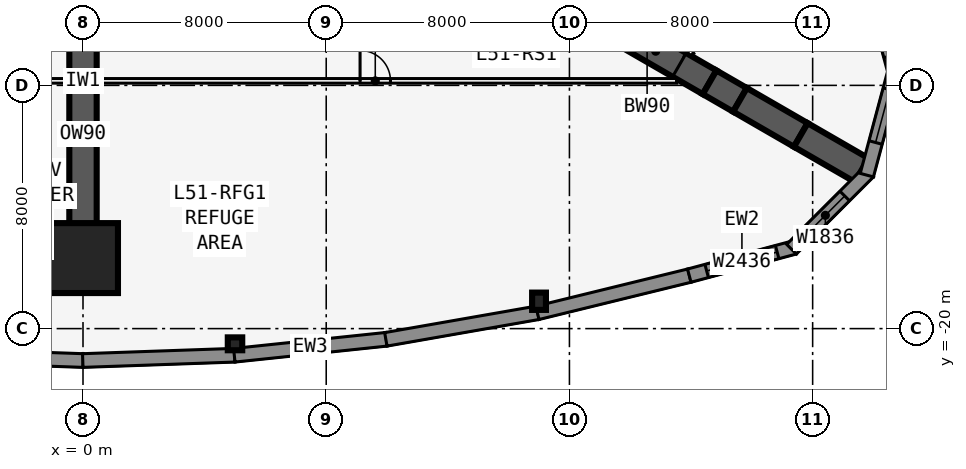
"""IFC4 building model, lengths in metres.
Left out: names, types, materials, properties, quantities, classifications, styles, units other than length and angle.
Written with IfcOpenShell. Run it as: python <this file> out.ifc"""

import sys

from ifc_helpers import new_model, si_unit, direction, frame, frame_2d, origin, origin_2d, place, context, subcontext, project, spatial, polyline, rectangle, i_section, outline, extrude, element, fill, save


model = new_model("IFC4")
c1 = context("Model", 3, precision=1e-05, world=origin(), true_north=direction((0.0, 1.0)))
c2 = subcontext(c1, "Body", "Model", "MODEL_VIEW")
j1 = project(units=[si_unit("LENGTHUNIT", "METRE"), si_unit("PLANEANGLEUNIT", "RADIAN")], contexts=[c1])
p1 = place(None, origin())
s1 = spatial("IfcSite", under=j1, at=p1, CompositionType="ELEMENT")
p2 = place(p1, origin())
s2 = spatial("IfcBuilding", under=s1, at=p2, CompositionType="ELEMENT")
p3 = place(p2, frame((0.0, 0.0, 189.5)))
s3 = spatial("IfcBuildingStorey", under=s2, at=p3, CompositionType="ELEMENT", Elevation=189.5)
p4 = place(p3, frame((16.5, -9.526, 0.0), z_axis=(0.0, 0.0, 1.0), x_axis=(0.866031398331, -0.499989616998, 0.0)))
e1 = element("IfcWall", 1, at=p4, inside=s3, PredefinedType="SHEAR", context=c2, shape_type="SweptSolid", body=[
    extrude(rectangle(XDim=4.746, YDim=0.9, at=frame_2d((2.373, 0.0))), origin(), (0.0, 0.0, 1.0), 6.4),
])
p5 = place(p4, frame((1.8, 0.0, 0.0)))
e2 = element("IfcOpeningElement", 2, at=p5, cuts=e1, PredefinedType="OPENING", context=c2, shape_type="SweptSolid", body=[
    extrude(rectangle(XDim=1.8, YDim=2.13, at=frame_2d((0.9, 1.065))), frame((0.0, 0.46, 0.0), z_axis=(0.0, -1.0, 0.0), x_axis=(1.0, 0.0, 0.0)), (0.0, 0.0, 1.0), 0.92),
])
p6 = place(p3, frame((20.61, -11.899, 0.0), z_axis=(0.0, 0.0, 1.0), x_axis=(0.866009537788, -0.500027479704, 0.0)))
e3 = element("IfcWall", 3, at=p6, inside=s3, PredefinedType="SHEAR", context=c2, shape_type="SweptSolid", body=[
    extrude(rectangle(XDim=1.155, YDim=0.9, at=frame_2d((0.577, 0.0))), origin(), (0.0, 0.0, 1.0), 6.4),
])
for number, where, z_axis, x_axis in (
    (4, (21.61, -12.477, 0.0), (0.0, 0.0, 1.0), (0.866, -0.5, 0.0)),
    (5, (23.61, -13.631, 0.0), (0.0, 0.0, 1.0), (0.866, -0.5, 0.0)),
):
    element("IfcWall", number, at=place(p3, frame(where, z_axis=z_axis, x_axis=x_axis)), inside=s3, PredefinedType="SHEAR", context=c2, shape_type="SweptSolid", body=[
        extrude(rectangle(XDim=2.309, YDim=0.9, at=frame_2d((1.155, 0.0))), origin(), (0.0, 0.0, 1.0), 6.4),
    ])
p7 = place(p3, frame((0.0, -9.526, 0.0), z_axis=(0.0, 0.0, 1.0), x_axis=(0.0, -1.0, 0.0)))
e6 = element("IfcWall", 6, at=p7, inside=s3, PredefinedType="SHEAR", context=c2, shape_type="SweptSolid", body=[
    extrude(rectangle(XDim=8.154, YDim=0.9, at=frame_2d((4.077, 0.0))), origin(), (0.0, 0.0, 1.0), 6.4),
])
p8 = place(p3, frame((5.0, -20.5, 0.0), z_axis=(0.0, 0.0, 1.0), x_axis=(0.0, -1.0, 0.0)))
e7 = element("IfcColumn", 7, at=p8, inside=s3, PredefinedType="COLUMN", context=c2, shape_type="SweptSolid", body=[
    extrude(i_section(OverallWidth=0.424, OverallDepth=0.475, WebThickness=0.048, FlangeThickness=0.077, at=origin_2d()), origin(), (0.0, 0.0, 1.0), 6.4),
])
p9 = place(p3, frame((15.0, -19.1, 0.0), z_axis=(0.0, 0.0, 1.0), x_axis=(1.0, 0.0, 0.0)))
e8 = element("IfcColumn", 8, at=p9, inside=s3, PredefinedType="COLUMN", context=c2, shape_type="SweptSolid", body=[
    extrude(i_section(OverallWidth=0.455, OverallDepth=0.569, WebThickness=0.078, FlangeThickness=0.125, at=origin_2d()), origin(), (0.0, 0.0, 1.0), 6.4),
])
p10 = place(p3, frame((0.0, -17.68, 0.0), z_axis=(0.0, 0.0, 1.0), x_axis=(0.0, -1.0, 0.0)))
e9 = element("IfcColumn", 9, at=p10, inside=s3, PredefinedType="COLUMN", context=c2, shape_type="SweptSolid", body=[
    extrude(rectangle(XDim=2.3, YDim=2.3, at=origin_2d()), origin(), (0.0, 0.0, 1.0), 6.4),
])
for number, where, z_axis, x_axis in (
    (10, (-4.992, -20.875, 0.0), (0.0, 0.0, 1.0), (0.999, -0.035, 0.0)),
    (11, (-0.008, -21.05, 0.0), (0.0, 0.0, 1.0), (0.999, 0.035, 0.0)),
):
    element("IfcWall", number, at=place(p3, frame(where, z_axis=z_axis, x_axis=x_axis)), inside=s3, PredefinedType="SOLIDWALL", context=c2, shape_type="SweptSolid", body=[
        extrude(outline(polyline([(0.0, 0.0), (5.003, 0.0), (5.003, 6.15), (0.0, 6.15), (0.0, 0.0)]), holes=[polyline([(4.402, 3.075), (4.337, 3.567), (4.147, 4.025), (3.845, 4.418), (3.451, 4.72), (2.993, 4.91), (2.501, 4.975), (2.01, 4.91), (1.552, 4.72), (1.158, 4.418), (0.856, 4.025), (0.666, 3.567), (0.602, 3.075), (0.666, 2.583), (0.856, 2.125), (1.158, 1.731), (1.552, 1.43), (2.01, 1.24), (2.501, 1.175), (2.993, 1.24), (3.451, 1.43), (3.845, 1.731), (4.147, 2.125), (4.337, 2.583), (4.402, 3.075)])]), frame((0.0, 0.225, 0.0), z_axis=(0.0, -1.0, 0.0), x_axis=(1.0, 0.0, 0.0)), (0.0, 0.0, 1.0), 0.45),
    ])
p11 = place(p3, frame((4.977, -20.876, 0.0), z_axis=(0.0, 0.0, 1.0), x_axis=(0.994529640305, 0.104454748843, 0.0)))
e12 = element("IfcWall", 12, at=p11, inside=s3, PredefinedType="SOLIDWALL", context=c2, shape_type="SweptSolid", body=[
    extrude(outline(polyline([(0.0, 0.0), (5.028, 0.0), (5.028, 6.15), (0.0, 6.15), (0.0, 0.0)]), holes=[polyline([(4.414, 3.075), (4.349, 3.567), (4.159, 4.025), (3.857, 4.418), (3.464, 4.72), (3.006, 4.91), (2.514, 4.975), (2.022, 4.91), (1.564, 4.72), (1.17, 4.418), (0.868, 4.025), (0.678, 3.567), (0.614, 3.075), (0.678, 2.583), (0.868, 2.125), (1.17, 1.731), (1.564, 1.43), (2.022, 1.24), (2.514, 1.175), (3.006, 1.24), (3.464, 1.43), (3.857, 1.731), (4.159, 2.125), (4.349, 2.583), (4.414, 3.075)])]), frame((0.0, 0.225, 0.0), z_axis=(0.0, -1.0, 0.0), x_axis=(1.0, 0.0, 0.0)), (0.0, 0.0, 1.0), 0.45),
])
p12 = place(p3, frame((9.961, -20.354, 0.0), z_axis=(0.0, 0.0, 1.0), x_axis=(0.985030467156, 0.172380331752, 0.0)))
e13 = element("IfcWall", 13, at=p12, inside=s3, PredefinedType="SOLIDWALL", context=c2, shape_type="SweptSolid", body=[
    extrude(outline(polyline([(0.0, 0.0), (5.076, 0.0), (5.076, 6.15), (0.0, 6.15), (0.0, 0.0)]), holes=[polyline([(4.438, 3.075), (4.373, 3.567), (4.183, 4.025), (3.882, 4.418), (3.488, 4.72), (3.03, 4.91), (2.538, 4.975), (2.046, 4.91), (1.588, 4.72), (1.195, 4.418), (0.893, 4.025), (0.703, 3.567), (0.638, 3.075), (0.703, 2.583), (0.893, 2.125), (1.195, 1.731), (1.588, 1.43), (2.046, 1.24), (2.538, 1.175), (3.03, 1.24), (3.488, 1.43), (3.882, 1.731), (4.183, 2.125), (4.373, 2.583), (4.438, 3.075)])]), frame((0.0, 0.225, 0.0), z_axis=(0.0, -1.0, 0.0), x_axis=(1.0, 0.0, 0.0)), (0.0, 0.0, 1.0), 0.45),
])
p13 = place(p3, frame((14.947, -19.482, 0.0), z_axis=(0.0, 0.0, 1.0), x_axis=(0.971270024053, 0.237980126011, 0.0)))
e14 = element("IfcWall", 14, at=p13, inside=s3, PredefinedType="SOLIDWALL", context=c2, shape_type="SweptSolid", body=[
    extrude(outline(polyline([(0.0, 0.0), (5.148, 0.0), (5.148, 6.15), (0.0, 6.15), (0.0, 0.0)]), holes=[polyline([(4.524, 3.075), (4.458, 3.58), (4.263, 4.05), (3.953, 4.454), (3.549, 4.764), (3.079, 4.958), (2.574, 5.025), (2.069, 4.958), (1.599, 4.764), (1.195, 4.454), (0.885, 4.05), (0.69, 3.58), (0.624, 3.075), (0.69, 2.57), (0.885, 2.1), (1.195, 1.696), (1.599, 1.386), (2.069, 1.191), (2.574, 1.125), (3.079, 1.191), (3.549, 1.386), (3.953, 1.696), (4.263, 2.1), (4.458, 2.57), (4.524, 3.075)])]), frame((0.0, 0.225, 0.0), z_axis=(0.0, -1.0, 0.0), x_axis=(1.0, 0.0, 0.0)), (0.0, 0.0, 1.0), 0.45),
])
p14 = place(p3, frame((19.942, -18.258, 0.0), z_axis=(0.0, 0.0, 1.0), x_axis=(0.965924653531, 0.258823421857, 0.0)))
e15 = element("IfcWall", 15, at=p14, inside=s3, PredefinedType="SOLIDWALL", context=c2, shape_type="SweptSolid", body=[
    extrude(rectangle(XDim=3.586, YDim=0.45, at=frame_2d((1.793, 0.0))), origin(), (0.0, 0.0, 1.0), 6.15),
])
p15 = place(p14, frame((0.593, 0.0, 1.2)))
e16 = element("IfcOpeningElement", 16, at=p15, cuts=e15, PredefinedType="OPENING", context=c2, shape_type="SweptSolid", body=[
    extrude(rectangle(XDim=2.4, YDim=3.6, at=frame_2d((1.2, 1.8))), frame((0.0, 0.235, 0.0), z_axis=(0.0, -1.0, 0.0), x_axis=(1.0, 0.0, 0.0)), (0.0, 0.0, 1.0), 0.47),
])
p16 = place(p3, frame((23.305, -17.388, 0.0), z_axis=(0.0, 0.0, 1.0), x_axis=(0.707106781187, 0.707106781187, 0.0)))
e17 = element("IfcWall", 17, at=p16, inside=s3, PredefinedType="SOLIDWALL", context=c2, shape_type="SweptSolid", body=[
    extrude(outline(polyline([(3.586, 0.225), (3.527, 0.225), (3.035, 0.093), (3.0, 0.225), (0.0, 0.225), (0.0, -0.225), (3.586, -0.225), (3.586, 0.225)])), origin(), (0.0, 0.0, 1.0), 6.15),
])
p17 = place(p16, frame((0.675, 0.0, 1.2)))
e18 = element("IfcOpeningElement", 18, at=p17, cuts=e17, PredefinedType="OPENING", context=c2, shape_type="SweptSolid", body=[
    extrude(rectangle(XDim=1.8, YDim=3.6, at=frame_2d((0.9, 1.8))), frame((0.0, 0.235, 0.0), z_axis=(0.0, -1.0, 0.0), x_axis=(1.0, 0.0, 0.0)), (0.0, 0.0, 1.0), 0.47),
])
p18 = place(p3, frame((25.783, -14.953, 0.0), z_axis=(0.0, 0.0, 1.0), x_axis=(0.258823421857, 0.965924653531, 0.0)))
e19 = element("IfcWall", 19, at=p18, inside=s3, PredefinedType="SOLIDWALL", context=c2, shape_type="SweptSolid", body=[
    extrude(outline(polyline([(3.586, 0.225), (0.586, 0.225), (0.551, 0.093), (0.06, 0.225), (0.0, 0.225), (0.0, -0.225), (3.586, -0.225), (3.586, 0.225)])), origin(), (0.0, 0.0, 1.0), 6.15),
])
p19 = place(p18, frame((1.111, 0.0, 1.2)))
e20 = element("IfcOpeningElement", 20, at=p19, cuts=e19, PredefinedType="OPENING", context=c2, shape_type="SweptSolid", body=[
    extrude(rectangle(XDim=1.8, YDim=3.6, at=frame_2d((0.9, 1.8))), frame((0.0, 0.235, 0.0), z_axis=(0.0, -1.0, 0.0), x_axis=(1.0, 0.0, 0.0)), (0.0, 0.0, 1.0), 0.47),
])
p20 = place(p3, frame((26.711, -11.605, 0.0), z_axis=(0.0, 0.0, 1.0), x_axis=(-0.258823421857, 0.965924653531, 0.0)))
e21 = element("IfcWall", 21, at=p20, inside=s3, PredefinedType="SOLIDWALL", context=c2, shape_type="SweptSolid", body=[
    extrude(rectangle(XDim=3.586, YDim=0.45, at=frame_2d((1.793, 0.0))), origin(), (0.0, 0.0, 1.0), 6.15),
])
p21 = place(p20, frame((0.593, 0.0, 1.2)))
e22 = element("IfcOpeningElement", 22, at=p21, cuts=e21, PredefinedType="OPENING", context=c2, shape_type="SweptSolid", body=[
    extrude(rectangle(XDim=2.4, YDim=3.6, at=frame_2d((1.2, 1.8))), frame((0.0, 0.235, 0.0), z_axis=(0.0, -1.0, 0.0), x_axis=(1.0, 0.0, 0.0)), (0.0, 0.0, 1.0), 0.47),
])
p22 = place(p3, frame((-19.527, -11.851, 0.0), z_axis=(0.0, 0.0, 1.0), x_axis=(1.0, 0.0, 0.0)))
e23 = element("IfcWall", 23, at=p22, inside=s3, PredefinedType="PARTITIONING", context=c2, shape_type="SweptSolid", body=[
    extrude(rectangle(XDim=39.054, YDim=0.15, at=frame_2d((19.527, 0.0))), origin(), (0.0, 0.0, 1.0), 6.15),
])
p23 = place(p22, frame((6.914, 0.0, 0.0)))
e24 = element("IfcOpeningElement", 24, at=p23, cuts=e23, PredefinedType="OPENING", context=c2, shape_type="SweptSolid", body=[
    extrude(rectangle(XDim=1.0, YDim=2.13, at=frame_2d((0.5, 1.065))), frame((0.0, 0.085, 0.0), z_axis=(0.0, -1.0, 0.0), x_axis=(1.0, 0.0, 0.0)), (0.0, 0.0, 1.0), 0.17),
])
p24 = place(p22, frame((16.527, 0.0, 0.0)))
e25 = element("IfcOpeningElement", 25, at=p24, cuts=e23, PredefinedType="OPENING", context=c2, shape_type="SweptSolid", body=[
    extrude(rectangle(XDim=1.0, YDim=2.13, at=frame_2d((0.5, 1.065))), frame((0.0, 0.085, 0.0), z_axis=(0.0, -1.0, 0.0), x_axis=(1.0, 0.0, 0.0)), (0.0, 0.0, 1.0), 0.17),
])
p25 = place(p22, frame((28.64, 0.0, 0.0)))
e26 = element("IfcOpeningElement", 26, at=p25, cuts=e23, PredefinedType="OPENING", context=c2, shape_type="SweptSolid", body=[
    extrude(rectangle(XDim=1.0, YDim=2.13, at=frame_2d((0.5, 1.065))), frame((0.0, 0.085, 0.0), z_axis=(0.0, -1.0, 0.0), x_axis=(1.0, 0.0, 0.0)), (0.0, 0.0, 1.0), 0.17),
])
p26 = place(p3, frame((20.027, -10.985, 0.0), z_axis=(0.0, 0.0, 1.0), x_axis=(-0.500001677587, 0.866024435227, 0.0)))
e27 = element("IfcWall", 27, at=p26, inside=s3, PredefinedType="PARTITIONING", context=c2, shape_type="SweptSolid", body=[
    extrude(rectangle(XDim=39.054, YDim=0.15, at=frame_2d((19.527, 0.0))), origin(), (0.0, 0.0, 1.0), 6.15),
])
p27 = place(p26, frame((5.914, 0.0, 0.0)))
e28 = element("IfcOpeningElement", 28, at=p27, cuts=e27, PredefinedType="OPENING", context=c2, shape_type="SweptSolid", body=[
    extrude(rectangle(XDim=1.0, YDim=2.13, at=frame_2d((0.5, 1.065))), frame((0.0, 0.085, 0.0), z_axis=(0.0, -1.0, 0.0), x_axis=(1.0, 0.0, 0.0)), (0.0, 0.0, 1.0), 0.17),
])
p28 = place(p26, frame((15.527, 0.0, 0.0)))
e29 = element("IfcOpeningElement", 29, at=p28, cuts=e27, PredefinedType="OPENING", context=c2, shape_type="SweptSolid", body=[
    extrude(rectangle(XDim=1.0, YDim=2.13, at=frame_2d((0.5, 1.065))), frame((0.0, 0.085, 0.0), z_axis=(0.0, -1.0, 0.0), x_axis=(1.0, 0.0, 0.0)), (0.0, 0.0, 1.0), 0.17),
])
p29 = place(p26, frame((22.027, 0.0, 0.0)))
e30 = element("IfcOpeningElement", 30, at=p29, cuts=e27, PredefinedType="OPENING", context=c2, shape_type="SweptSolid", body=[
    extrude(rectangle(XDim=1.0, YDim=2.13, at=frame_2d((0.5, 1.065))), frame((0.0, 0.085, 0.0), z_axis=(0.0, -1.0, 0.0), x_axis=(1.0, 0.0, 0.0)), (0.0, 0.0, 1.0), 0.17),
])
p30 = place(p26, frame((31.64, 0.0, 0.0)))
e31 = element("IfcOpeningElement", 31, at=p30, cuts=e27, PredefinedType="OPENING", context=c2, shape_type="SweptSolid", body=[
    extrude(rectangle(XDim=1.0, YDim=2.13, at=frame_2d((0.5, 1.065))), frame((0.0, 0.085, 0.0), z_axis=(0.0, -1.0, 0.0), x_axis=(1.0, 0.0, 0.0)), (0.0, 0.0, 1.0), 0.17),
])
p31 = place(p3, frame((-0.5, 22.836, 0.0), z_axis=(0.0, 0.0, 1.0), x_axis=(-0.500001677587, -0.866024435227, 0.0)))
e32 = element("IfcWall", 32, at=p31, inside=s3, PredefinedType="PARTITIONING", context=c2, shape_type="SweptSolid", body=[
    extrude(rectangle(XDim=39.054, YDim=0.15, at=frame_2d((19.527, 0.0))), origin(), (0.0, 0.0, 1.0), 6.15),
])
p32 = place(p31, frame((7.914, 0.0, 0.0)))
e33 = element("IfcOpeningElement", 33, at=p32, cuts=e32, PredefinedType="OPENING", context=c2, shape_type="SweptSolid", body=[
    extrude(rectangle(XDim=1.0, YDim=2.13, at=frame_2d((0.5, 1.065))), frame((0.0, 0.085, 0.0), z_axis=(0.0, -1.0, 0.0), x_axis=(1.0, 0.0, 0.0)), (0.0, 0.0, 1.0), 0.17),
])
p33 = place(p31, frame((17.527, 0.0, 0.0)))
e34 = element("IfcOpeningElement", 34, at=p33, cuts=e32, PredefinedType="OPENING", context=c2, shape_type="SweptSolid", body=[
    extrude(rectangle(XDim=1.0, YDim=2.13, at=frame_2d((0.5, 1.065))), frame((0.0, 0.085, 0.0), z_axis=(0.0, -1.0, 0.0), x_axis=(1.0, 0.0, 0.0)), (0.0, 0.0, 1.0), 0.17),
])
p34 = place(p31, frame((28.64, 0.0, 0.0)))
e35 = element("IfcOpeningElement", 35, at=p34, cuts=e32, PredefinedType="OPENING", context=c2, shape_type="SweptSolid", body=[
    extrude(rectangle(XDim=1.0, YDim=2.13, at=frame_2d((0.5, 1.065))), frame((0.0, 0.085, 0.0), z_axis=(0.0, -1.0, 0.0), x_axis=(1.0, 0.0, 0.0)), (0.0, 0.0, 1.0), 0.17),
])
p35 = place(p15, origin())
e36 = element("IfcWindow", 36, at=p35, inside=s3, PartitioningType="SINGLE_PANEL", PredefinedType="WINDOW", context=c2, shape_type="SweptSolid", body=[
    extrude(rectangle(XDim=2.4, YDim=3.6, at=frame_2d((1.2, 1.8))), frame((0.0, 0.03, 0.0), z_axis=(0.0, -1.0, 0.0), x_axis=(1.0, 0.0, 0.0)), (0.0, 0.0, 1.0), 0.06),
])
fill(e16, e36)
p36 = place(p17, origin())
e37 = element("IfcWindow", 37, at=p36, inside=s3, PartitioningType="SINGLE_PANEL", PredefinedType="WINDOW", context=c2, shape_type="SweptSolid", body=[
    extrude(rectangle(XDim=1.8, YDim=3.6, at=frame_2d((0.9, 1.8))), frame((0.0, 0.03, 0.0), z_axis=(0.0, -1.0, 0.0), x_axis=(1.0, 0.0, 0.0)), (0.0, 0.0, 1.0), 0.06),
])
fill(e18, e37)
p37 = place(p19, origin())
e38 = element("IfcWindow", 38, at=p37, inside=s3, PartitioningType="SINGLE_PANEL", PredefinedType="WINDOW", context=c2, shape_type="SweptSolid", body=[
    extrude(rectangle(XDim=1.8, YDim=3.6, at=frame_2d((0.9, 1.8))), frame((0.0, 0.03, 0.0), z_axis=(0.0, -1.0, 0.0), x_axis=(1.0, 0.0, 0.0)), (0.0, 0.0, 1.0), 0.06),
])
fill(e20, e38)
p38 = place(p21, origin())
e39 = element("IfcWindow", 39, at=p38, inside=s3, PartitioningType="SINGLE_PANEL", PredefinedType="WINDOW", context=c2, shape_type="SweptSolid", body=[
    extrude(rectangle(XDim=2.4, YDim=3.6, at=frame_2d((1.2, 1.8))), frame((0.0, 0.03, 0.0), z_axis=(0.0, -1.0, 0.0), x_axis=(1.0, 0.0, 0.0)), (0.0, 0.0, 1.0), 0.06),
])
fill(e22, e39)
p39 = place(p25, origin())
e40 = element("IfcDoor", 40, at=p39, inside=s3, OperationType="SINGLE_SWING_LEFT", PredefinedType="DOOR", context=c2, shape_type="SweptSolid", body=[
    extrude(rectangle(XDim=1.0, YDim=2.13, at=frame_2d((0.5, 1.065))), frame((0.0, 0.025, 0.0), z_axis=(0.0, -1.0, 0.0), x_axis=(1.0, 0.0, 0.0)), (0.0, 0.0, 1.0), 0.05),
])
fill(e26, e40)
p40 = place(p5, origin())
e41 = element("IfcDoor", 41, at=p40, inside=s3, OperationType="DOUBLE_DOOR_DOUBLE_SWING", PredefinedType="DOOR", context=c2, shape_type="SweptSolid", body=[
    extrude(rectangle(XDim=1.8, YDim=2.13, at=frame_2d((0.9, 1.065))), frame((0.0, 0.025, 0.0), z_axis=(0.0, -1.0, 0.0), x_axis=(1.0, 0.0, 0.0)), (0.0, 0.0, 1.0), 0.05),
])
fill(e2, e41)
save(model, sys.argv[1])
